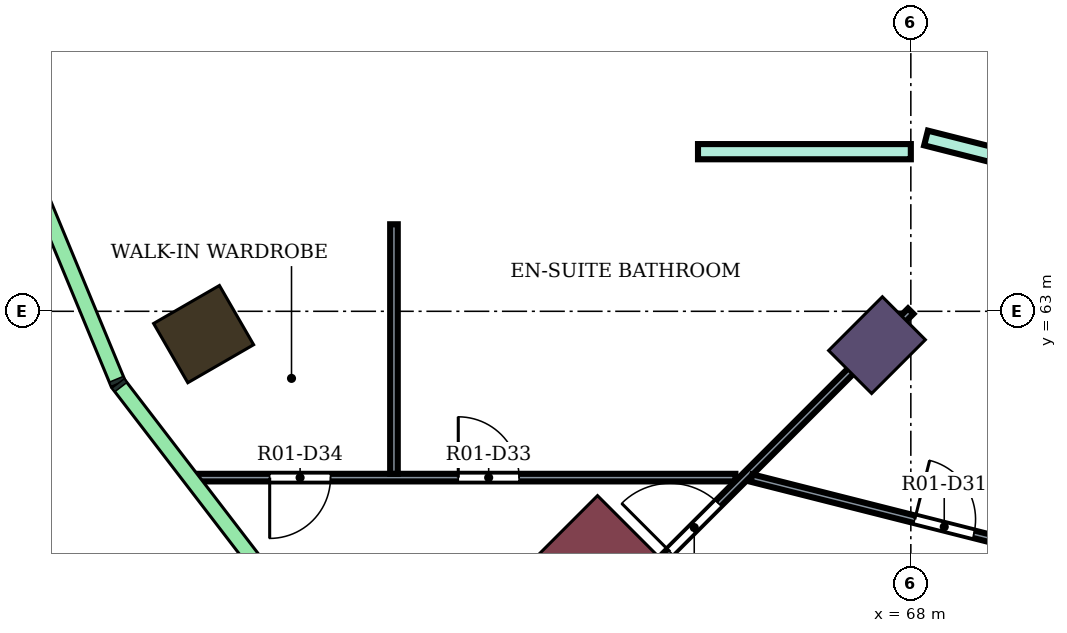
"""IFC4 building model, lengths in metres.
Left out: names, types, materials, properties, quantities, classifications, styles, units other than length and angle.
Written with IfcOpenShell. Run it as: python <this file> out.ifc"""

import sys

from ifc_helpers import new_model, si_unit, direction, frame, frame_2d, origin, origin_2d, place, context, subcontext, project, spatial, rectangle, extrude, element, fill, save


model = new_model("IFC4")
c1 = context("Model", 3, precision=1e-05, world=origin(), true_north=direction((0.0, 1.0)))
c2 = subcontext(c1, "Body", "Model", "MODEL_VIEW")
j1 = project(units=[si_unit("LENGTHUNIT", "METRE"), si_unit("PLANEANGLEUNIT", "RADIAN")], contexts=[c1])
p1 = place(None, origin())
s1 = spatial("IfcSite", under=j1, at=p1, CompositionType="ELEMENT")
p2 = place(p1, origin())
s2 = spatial("IfcBuilding", under=s1, at=p2, CompositionType="ELEMENT")
p3 = place(p2, frame((0.0, 0.0, 165.9)))
s3 = spatial("IfcBuildingStorey", under=s2, at=p3, CompositionType="ELEMENT", Elevation=165.9)
p4 = place(p3, frame((58.696, 62.7, 0.0), z_axis=(0.0, 0.0, 1.0), x_axis=(-0.866025403784, -0.5, 0.0)))
e1 = element("IfcColumn", 1, at=p4, inside=s3, PredefinedType="COLUMN", context=c2, shape_type="SweptSolid", body=[
    extrude(rectangle(XDim=1.0, YDim=0.9, at=origin_2d()), origin(), (0.0, 0.0, 1.0), 4.1),
])
p5 = place(p3, frame((67.555, 62.555, 0.0), z_axis=(0.0, 0.0, 1.0), x_axis=(-0.707106781187, -0.707106781187, 0.0)))
e2 = element("IfcColumn", 2, at=p5, inside=s3, PredefinedType="COLUMN", context=c2, shape_type="SweptSolid", body=[
    extrude(rectangle(XDim=1.0, YDim=0.8, at=origin_2d()), origin(), (0.0, 0.0, 1.0), 4.1),
])
p6 = place(p3, frame((64.09, 59.09, 0.0), z_axis=(0.0, 0.0, 1.0), x_axis=(-0.707106781187, -0.707106781187, 0.0)))
e3 = element("IfcColumn", 3, at=p6, inside=s3, PredefinedType="COLUMN", context=c2, shape_type="SweptSolid", body=[
    extrude(rectangle(XDim=1.8, YDim=2.4, at=origin_2d()), origin(), (0.0, 0.0, 1.0), 4.1),
])
p7 = place(p3, frame((65.2, 65.1, 0.0), z_axis=(0.0, 0.0, 1.0), x_axis=(1.0, 0.0, 0.0)))
e4 = element("IfcWall", 4, at=p7, inside=s3, PredefinedType="PARTITIONING", context=c2, shape_type="SweptSolid", body=[
    extrude(rectangle(XDim=2.8, YDim=0.2, at=frame_2d((1.4, 0.0))), origin(), (0.0, 0.0, 1.0), 3.65),
])
p8 = place(p3, frame((68.2, 65.28, 0.0), z_axis=(0.0, 0.0, 1.0), x_axis=(0.969450596516, -0.245286650503, 0.0)))
e5 = element("IfcWall", 5, at=p8, inside=s3, PredefinedType="PARTITIONING", context=c2, shape_type="SweptSolid", body=[
    extrude(rectangle(XDim=5.928, YDim=0.2, at=frame_2d((2.964, 0.0))), origin(), (0.0, 0.0, 1.0), 3.65),
])
p9 = place(p3, frame((58.6, 60.812, 0.0), z_axis=(0.0, 0.0, 1.0), x_axis=(1.0, 0.0, 0.0)))
e6 = element("IfcWall", 6, at=p9, inside=s3, PredefinedType="PARTITIONING", context=c2, shape_type="SweptSolid", body=[
    extrude(rectangle(XDim=7.092, YDim=0.1, at=frame_2d((3.546, 0.0))), origin(), (0.0, 0.0, 1.0), 3.65),
])
p10 = place(p9, frame((3.446, 0.0, 0.0)))
e7 = element("IfcOpeningElement", 7, at=p10, cuts=e6, PredefinedType="OPENING", context=c2, shape_type="SweptSolid", body=[
    extrude(rectangle(XDim=0.8, YDim=2.1, at=frame_2d((0.4, 1.05))), frame((0.0, 0.06, 0.0), z_axis=(0.0, -1.0, 0.0), x_axis=(1.0, 0.0, 0.0)), (0.0, 0.0, 1.0), 0.12),
])
p11 = place(p9, frame((0.965, 0.0, 0.0)))
e8 = element("IfcOpeningElement", 8, at=p11, cuts=e6, PredefinedType="OPENING", context=c2, shape_type="SweptSolid", body=[
    extrude(rectangle(XDim=0.8, YDim=2.1, at=frame_2d((0.4, 1.05))), frame((0.0, 0.06, 0.0), z_axis=(0.0, -1.0, 0.0), x_axis=(1.0, 0.0, 0.0)), (0.0, 0.0, 1.0), 0.12),
])
p12 = place(p3, frame((61.2, 60.862, 0.0), z_axis=(0.0, 0.0, 1.0), x_axis=(0.0, 1.0, 0.0)))
e9 = element("IfcWall", 9, at=p12, inside=s3, PredefinedType="PARTITIONING", context=c2, shape_type="SweptSolid", body=[
    extrude(rectangle(XDim=3.283, YDim=0.1, at=frame_2d((1.642, 0.0))), origin(), (0.0, 0.0, 1.0), 3.65),
])
p13 = place(p3, frame((63.593, 58.598, 0.0), z_axis=(0.0, 0.0, 1.0), x_axis=(0.707243952197, 0.706969583561, 0.0)))
e10 = element("IfcWall", 10, at=p13, inside=s3, PredefinedType="PARTITIONING", context=c2, shape_type="SweptSolid", body=[
    extrude(rectangle(XDim=6.229, YDim=0.1, at=frame_2d((3.114, 0.0))), origin(), (0.0, 0.0, 1.0), 3.65),
])
p14 = place(p13, frame((1.752, 0.0, 0.0)))
e11 = element("IfcOpeningElement", 11, at=p14, cuts=e10, PredefinedType="OPENING", context=c2, shape_type="SweptSolid", body=[
    extrude(rectangle(XDim=0.9, YDim=2.1, at=frame_2d((0.45, 1.05))), frame((0.0, 0.06, 0.0), z_axis=(0.0, -1.0, 0.0), x_axis=(1.0, 0.0, 0.0)), (0.0, 0.0, 1.0), 0.12),
])
p15 = place(p3, frame((65.904, 60.806, 0.0), z_axis=(0.0, 0.0, 1.0), x_axis=(0.969477107154, -0.245181848237, 0.0)))
e12 = element("IfcWall", 12, at=p15, inside=s3, PredefinedType="PARTITIONING", context=c2, shape_type="SweptSolid", body=[
    extrude(rectangle(XDim=5.252, YDim=0.1, at=frame_2d((2.626, 0.0))), origin(), (0.0, 0.0, 1.0), 3.65),
])
p16 = place(p15, frame((2.216, 0.0, 0.0)))
e13 = element("IfcOpeningElement", 13, at=p16, cuts=e12, PredefinedType="OPENING", context=c2, shape_type="SweptSolid", body=[
    extrude(rectangle(XDim=0.8, YDim=2.1, at=frame_2d((0.4, 1.05))), frame((0.0, 0.06, 0.0), z_axis=(0.0, -1.0, 0.0), x_axis=(1.0, 0.0, 0.0)), (0.0, 0.0, 1.0), 0.12),
])
p17 = place(p3, frame((67.101, 52.659, 0.0), z_axis=(0.0, 0.0, 1.0), x_axis=(0.499985055897, 0.866034031594, 0.0)))
e14 = element("IfcWall", 14, at=p17, inside=s3, PredefinedType="PARTITIONING", context=c2, shape_type="SweptSolid", body=[
    extrude(rectangle(XDim=12.876, YDim=0.1, at=frame_2d((6.438, 0.0))), origin(), (0.0, 0.0, 1.0), 3.65),
])
p18 = place(p17, frame((2.504, 0.0, 0.0)))
e15 = element("IfcOpeningElement", 15, at=p18, cuts=e14, PredefinedType="OPENING", context=c2, shape_type="SweptSolid", body=[
    extrude(rectangle(XDim=0.9, YDim=2.1, at=frame_2d((0.45, 1.05))), frame((0.0, 0.06, 0.0), z_axis=(0.0, -1.0, 0.0), x_axis=(1.0, 0.0, 0.0)), (0.0, 0.0, 1.0), 0.12),
])
p19 = place(p16, origin())
e16 = element("IfcDoor", 16, at=p19, inside=s3, OperationType="SINGLE_SWING_LEFT", PredefinedType="DOOR", context=c2, shape_type="SweptSolid", body=[
    extrude(rectangle(XDim=0.8, YDim=2.1, at=frame_2d((0.4, 1.05))), frame((0.0, 0.025, 0.0), z_axis=(0.0, -1.0, 0.0), x_axis=(1.0, 0.0, 0.0)), (0.0, 0.0, 1.0), 0.05),
])
fill(e13, e16)
p20 = place(p14, origin())
e17 = element("IfcDoor", 17, at=p20, inside=s3, OperationType="SINGLE_SWING_LEFT", PredefinedType="DOOR", context=c2, shape_type="SweptSolid", body=[
    extrude(rectangle(XDim=0.9, YDim=2.1, at=frame_2d((0.45, 1.05))), frame((0.0, 0.025, 0.0), z_axis=(0.0, -1.0, 0.0), x_axis=(1.0, 0.0, 0.0)), (0.0, 0.0, 1.0), 0.05),
])
fill(e11, e17)
p21 = place(p10, origin())
e18 = element("IfcDoor", 18, at=p21, inside=s3, OperationType="SINGLE_SWING_LEFT", PredefinedType="DOOR", context=c2, shape_type="SweptSolid", body=[
    extrude(rectangle(XDim=0.8, YDim=2.1, at=frame_2d((0.4, 1.05))), frame((0.0, 0.025, 0.0), z_axis=(0.0, -1.0, 0.0), x_axis=(1.0, 0.0, 0.0)), (0.0, 0.0, 1.0), 0.05),
])
fill(e7, e18)
p22 = place(p11, frame((0.8, 0.0, 0.0), z_axis=(0.0, 0.0, 1.0), x_axis=(-1.0, 0.0, 0.0)))
e19 = element("IfcDoor", 19, at=p22, inside=s3, OperationType="SINGLE_SWING_RIGHT", PredefinedType="DOOR", context=c2, shape_type="SweptSolid", body=[
    extrude(rectangle(XDim=0.8, YDim=2.1, at=frame_2d((0.4, 1.05))), frame((0.0, 0.025, 0.0), z_axis=(0.0, -1.0, 0.0), x_axis=(1.0, 0.0, 0.0)), (0.0, 0.0, 1.0), 0.05),
])
fill(e8, e19)
save(model, sys.argv[1])
